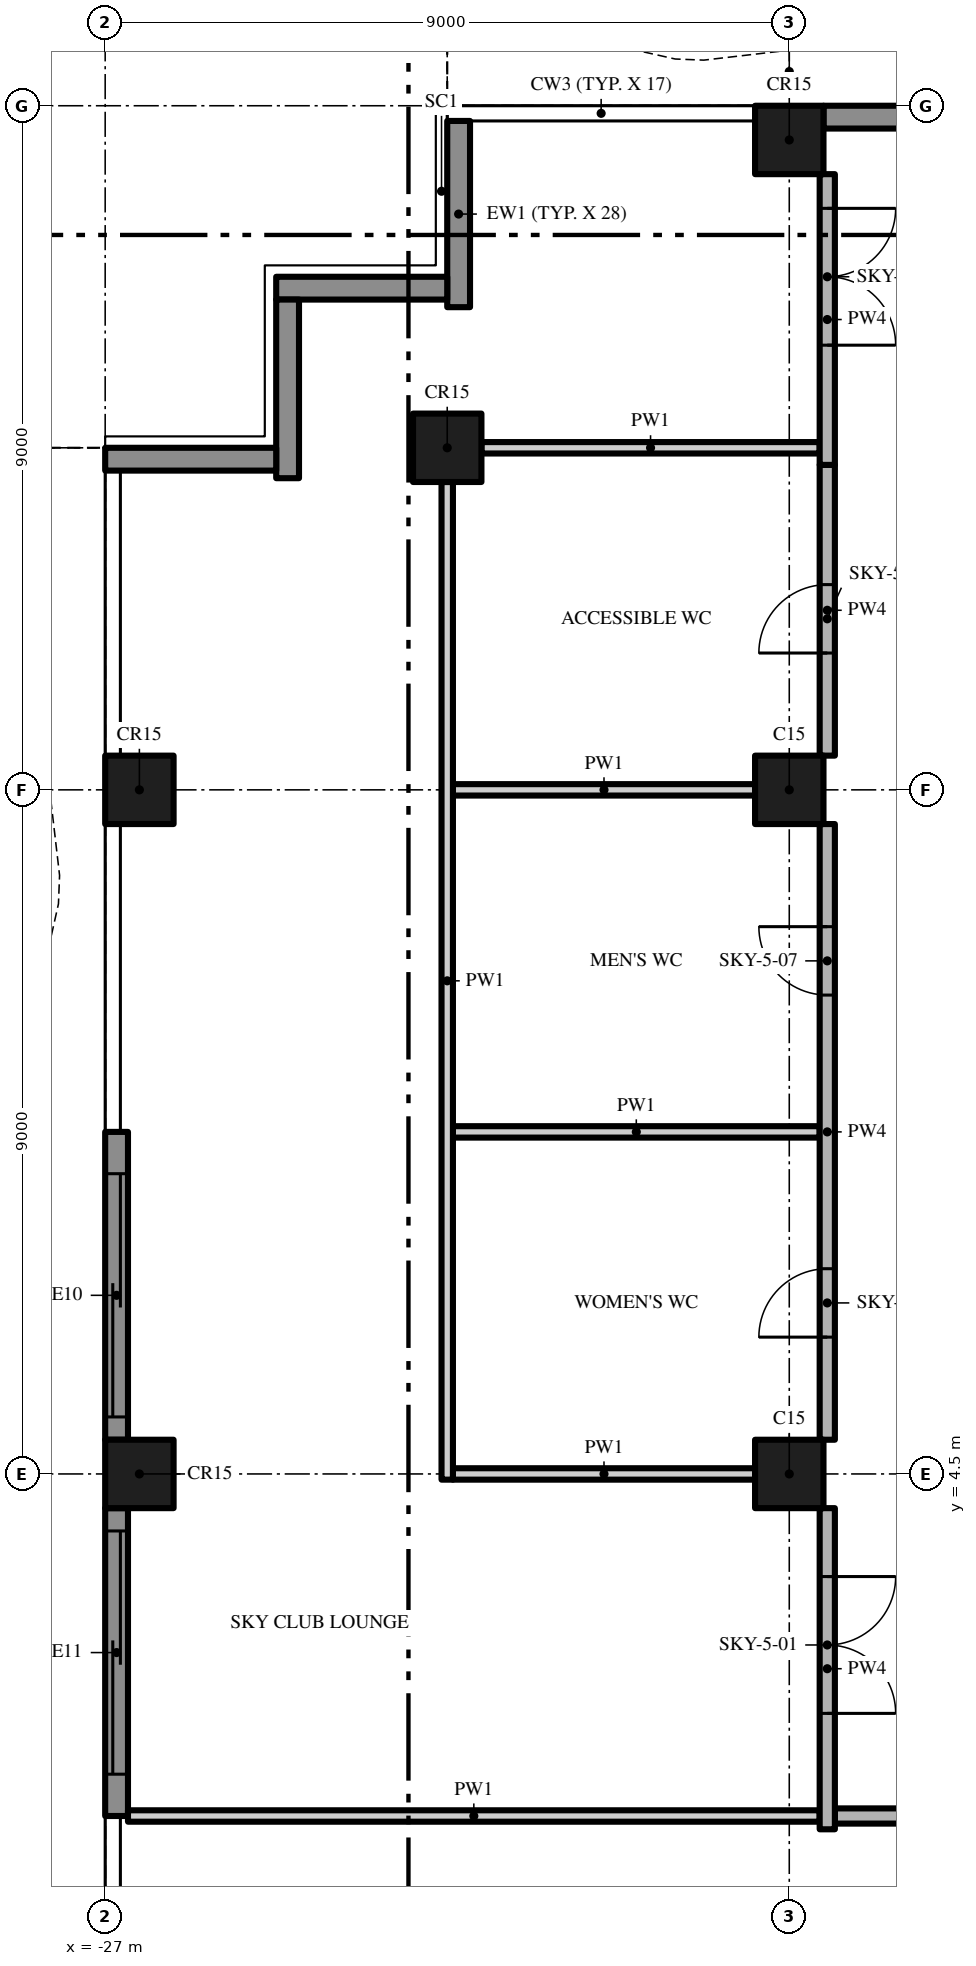
"""IFC4 building model, lengths in metres.
Left out: names, types, materials, properties, quantities, classifications, styles, units other than length and angle.
Written with IfcOpenShell. Run it as: python <this file> out.ifc"""

import sys

from ifc_helpers import new_model, si_unit, direction, frame, frame_2d, origin, origin_2d, place, context, subcontext, project, spatial, polyline, rectangle, outline, extrude, element, fill, save


model = new_model("IFC4")
c1 = context("Model", 3, precision=1e-05, world=origin(), true_north=direction((0.0, 1.0)))
c2 = subcontext(c1, "Body", "Model", "MODEL_VIEW")
j1 = project(units=[si_unit("LENGTHUNIT", "METRE"), si_unit("PLANEANGLEUNIT", "RADIAN")], contexts=[c1])
p1 = place(None, origin())
s1 = spatial("IfcSite", under=j1, at=p1, CompositionType="ELEMENT")
p2 = place(p1, origin())
s2 = spatial("IfcBuilding", under=s1, at=p2, CompositionType="ELEMENT")
p3 = place(p2, frame((0.0, 0.0, 284.4)))
s3 = spatial("IfcBuildingStorey", under=s2, at=p3, CompositionType="ELEMENT", Elevation=284.4)
for number, where, z_axis, x_axis in (
    (1, (-18.0, 13.5, 0.0), (0.0, 0.0, 1.0), (1.0, 0.0, 0.0)),
    (2, (-18.0, 22.05, 0.0), (0.0, 0.0, 1.0), (1.0, 0.0, 0.0)),
    (3, (-18.0, 4.5, 0.0), (0.0, 0.0, 1.0), (1.0, 0.0, 0.0)),
    (4, (-26.55, 13.5, 0.0), (0.0, 0.0, 1.0), (1.0, 0.0, 0.0)),
    (5, (-22.5, 18.0, 0.0), (0.0, 0.0, 1.0), (1.0, 0.0, 0.0)),
    (6, (-26.55, 4.5, 0.0), (0.0, 0.0, 1.0), (1.0, 0.0, 0.0)),
):
    element("IfcColumn", number, at=place(p3, frame(where, z_axis=z_axis, x_axis=x_axis)), inside=s3, PredefinedType="COLUMN", context=c2, shape_type="SweptSolid", body=[
        extrude(rectangle(XDim=0.9, YDim=0.9, at=origin_2d()), origin(), (0.0, 0.0, 1.0), 4.7),
    ])
p4 = place(p3, frame((-17.55, 22.35, 0.0), z_axis=(0.0, 0.0, 1.0), x_axis=(1.0, 0.0, 0.0)))
e7 = element("IfcWall", 7, at=p4, inside=s3, PredefinedType="SOLIDWALL", context=c2, shape_type="SweptSolid", body=[
    extrude(rectangle(XDim=4.05, YDim=0.3, at=frame_2d((2.025, 0.0))), origin(), (0.0, 0.0, 1.0), 4.7),
])
p5 = place(p4, frame((1.1, 0.0, 0.0)))
e8 = element("IfcOpeningElement", 8, at=p5, cuts=e7, PredefinedType="OPENING", context=c2, shape_type="SweptSolid", body=[
    extrude(rectangle(XDim=2.4, YDim=2.4, at=frame_2d((1.2, 1.2))), frame((0.0, 0.16, 0.0), z_axis=(0.0, -1.0, 0.0), x_axis=(1.0, 0.0, 0.0)), (0.0, 0.0, 1.0), 0.32),
])
p6 = place(p3, frame((-22.35, 19.85, 0.0), z_axis=(0.0, 0.0, 1.0), x_axis=(0.0, 1.0, 0.0)))
e9 = element("IfcWall", 9, at=p6, inside=s3, PredefinedType="SOLIDWALL", context=c2, shape_type="SweptSolid", body=[
    extrude(rectangle(XDim=2.45, YDim=0.3, at=frame_2d((1.225, 0.0))), origin(), (0.0, 0.0, 1.0), 4.7),
])
p7 = place(p3, frame((-24.75, 20.1, 0.0), z_axis=(0.0, 0.0, 1.0), x_axis=(1.0, 0.0, 0.0)))
e10 = element("IfcWall", 10, at=p7, inside=s3, PredefinedType="SOLIDWALL", context=c2, shape_type="SweptSolid", body=[
    extrude(rectangle(XDim=2.25, YDim=0.3, at=frame_2d((1.125, 0.0))), origin(), (0.0, 0.0, 1.0), 4.7),
])
p8 = place(p3, frame((-24.6, 17.6, 0.0), z_axis=(0.0, 0.0, 1.0), x_axis=(0.0, 1.0, 0.0)))
e11 = element("IfcWall", 11, at=p8, inside=s3, PredefinedType="SOLIDWALL", context=c2, shape_type="SweptSolid", body=[
    extrude(rectangle(XDim=2.35, YDim=0.3, at=frame_2d((1.175, 0.0))), origin(), (0.0, 0.0, 1.0), 4.7),
])
p9 = place(p3, frame((-27.0, 17.85, 0.0), z_axis=(0.0, 0.0, 1.0), x_axis=(1.0, 0.0, 0.0)))
e12 = element("IfcWall", 12, at=p9, inside=s3, PredefinedType="SOLIDWALL", context=c2, shape_type="SweptSolid", body=[
    extrude(rectangle(XDim=2.25, YDim=0.3, at=frame_2d((1.125, 0.0))), origin(), (0.0, 0.0, 1.0), 4.7),
])
p10 = place(p3, frame((-26.85, 4.95, 0.0), z_axis=(0.0, 0.0, 1.0), x_axis=(0.0, 1.0, 0.0)))
e13 = element("IfcWall", 13, at=p10, inside=s3, PredefinedType="SOLIDWALL", context=c2, shape_type="SweptSolid", body=[
    extrude(rectangle(XDim=4.05, YDim=0.3, at=frame_2d((2.025, 0.0))), origin(), (0.0, 0.0, 1.0), 4.7),
])
p11 = place(p10, frame((0.3, 0.0, 0.0)))
e14 = element("IfcOpeningElement", 14, at=p11, cuts=e13, PredefinedType="OPENING", context=c2, shape_type="SweptSolid", body=[
    extrude(rectangle(XDim=3.2, YDim=2.4, at=frame_2d((1.6, 1.2))), frame((0.0, 0.16, 0.0), z_axis=(0.0, -1.0, 0.0), x_axis=(1.0, 0.0, 0.0)), (0.0, 0.0, 1.0), 0.32),
])
p12 = place(p3, frame((-26.85, 0.0, 0.0), z_axis=(0.0, 0.0, 1.0), x_axis=(0.0, 1.0, 0.0)))
e15 = element("IfcWall", 15, at=p12, inside=s3, PredefinedType="SOLIDWALL", context=c2, shape_type="SweptSolid", body=[
    extrude(rectangle(XDim=4.05, YDim=0.3, at=frame_2d((2.025, 0.0))), origin(), (0.0, 0.0, 1.0), 4.7),
])
p13 = place(p12, frame((0.55, 0.0, 0.0)))
e16 = element("IfcOpeningElement", 16, at=p13, cuts=e15, PredefinedType="OPENING", context=c2, shape_type="SweptSolid", body=[
    extrude(rectangle(XDim=3.2, YDim=2.4, at=frame_2d((1.6, 1.2))), frame((0.0, 0.16, 0.0), z_axis=(0.0, -1.0, 0.0), x_axis=(1.0, 0.0, 0.0)), (0.0, 0.0, 1.0), 0.32),
])
p14 = place(p3, origin())
e17 = element("IfcWall", 17, at=p14, inside=s3, PredefinedType="USERDEFINED", context=c2, shape_type="SweptSolid", body=[
    extrude(outline(polyline([(-13.5, 25.149), (-15.0, 24.488), (-16.5, 23.755), (-18.0, 23.231), (-19.125, 23.1), (-19.5, 23.115), (-21.0, 23.451), (-22.5, 24.112), (-22.601, 23.883), (-21.079, 23.213), (-19.533, 22.866), (-19.115, 22.849), (-17.944, 22.986), (-16.404, 23.524), (-14.895, 24.261), (-13.399, 24.92), (-13.5, 25.149)])), origin(), (0.0, 0.0, 1.0), 0.9),
])
p15 = place(p3, origin())
e18 = element("IfcWall", 18, at=p15, inside=s3, PredefinedType="USERDEFINED", context=c2, shape_type="SweptSolid", body=[
    extrude(outline(polyline([(-29.649, 18.0), (-28.988, 16.5), (-28.255, 15.0), (-27.731, 13.5), (-27.6, 12.375), (-27.615, 12.0), (-27.951, 10.5), (-28.612, 9.0), (-29.345, 7.5), (-29.869, 6.0), (-30.0, 4.875), (-29.985, 4.5), (-29.649, 3.0), (-28.988, 1.5), (-28.255, 0.0), (-27.731, -1.5), (-27.6, -2.625), (-27.615, -3.0), (-27.951, -4.5), (-28.612, -6.0), (-29.345, -7.5), (-29.869, -9.0), (-30.0, -10.125), (-29.985, -10.5), (-29.649, -12.0), (-28.988, -13.5), (-28.255, -15.0), (-27.731, -16.5), (-27.6, -17.625), (-27.615, -18.0), (-27.365, -18.01), (-27.349, -17.615), (-27.486, -16.444), (-28.024, -14.904), (-28.761, -13.395), (-29.41, -11.921), (-29.736, -10.467), (-29.749, -10.135), (-29.624, -9.056), (-29.114, -7.596), (-28.385, -6.105), (-27.713, -4.579), (-27.366, -3.033), (-27.349, -2.615), (-27.486, -1.444), (-28.024, 0.096), (-28.761, 1.605), (-29.41, 3.079), (-29.736, 4.533), (-29.749, 4.865), (-29.624, 5.944), (-29.114, 7.404), (-28.385, 8.895), (-27.713, 10.421), (-27.366, 11.967), (-27.349, 12.385), (-27.486, 13.556), (-28.024, 15.096), (-28.761, 16.605), (-29.42, 18.101), (-29.649, 18.0)])), origin(), (0.0, 0.0, 1.0), 0.9),
])
p16 = place(p3, frame((-17.4, 0.0, 0.0), z_axis=(0.0, 0.0, 1.0), x_axis=(1.0, 0.0, 0.0)))
e19 = element("IfcWall", 19, at=p16, inside=s3, PredefinedType="PARTITIONING", context=c2, shape_type="SweptSolid", body=[
    extrude(rectangle(XDim=34.8, YDim=0.2, at=frame_2d((17.4, 0.0))), origin(), (0.0, 0.0, 1.0), 4.7),
])
p17 = place(p16, frame((7.65, 0.0, 0.0)))
e20 = element("IfcOpeningElement", 20, at=p17, cuts=e19, PredefinedType="OPENING", context=c2, shape_type="SweptSolid", body=[
    extrude(rectangle(XDim=2.0, YDim=2.4, at=frame_2d((1.0, 1.2))), frame((0.0, 0.11, 0.0), z_axis=(0.0, -1.0, 0.0), x_axis=(1.0, 0.0, 0.0)), (0.0, 0.0, 1.0), 0.22),
])
p18 = place(p16, frame((25.15, 0.0, 0.0)))
e21 = element("IfcOpeningElement", 21, at=p18, cuts=e19, PredefinedType="OPENING", context=c2, shape_type="SweptSolid", body=[
    extrude(rectangle(XDim=2.0, YDim=2.4, at=frame_2d((1.0, 1.2))), frame((0.0, 0.11, 0.0), z_axis=(0.0, -1.0, 0.0), x_axis=(1.0, 0.0, 0.0)), (0.0, 0.0, 1.0), 0.22),
])
p19 = place(p3, frame((-26.7, 0.0, 0.0), z_axis=(0.0, 0.0, 1.0), x_axis=(1.0, 0.0, 0.0)))
e22 = element("IfcWall", 22, at=p19, inside=s3, PredefinedType="PARTITIONING", context=c2, shape_type="SweptSolid", body=[
    extrude(rectangle(XDim=9.1, YDim=0.15, at=frame_2d((4.55, 0.0))), origin(), (0.0, 0.0, 1.0), 4.7),
])
p20 = place(p3, frame((-22.425, 4.5, 0.0), z_axis=(0.0, 0.0, 1.0), x_axis=(1.0, 0.0, 0.0)))
e23 = element("IfcWall", 23, at=p20, inside=s3, PredefinedType="PARTITIONING", context=c2, shape_type="SweptSolid", body=[
    extrude(rectangle(XDim=3.975, YDim=0.15, at=frame_2d((1.988, 0.0))), origin(), (0.0, 0.0, 1.0), 4.7),
])
p21 = place(p3, frame((-22.425, 9.0, 0.0), z_axis=(0.0, 0.0, 1.0), x_axis=(1.0, 0.0, 0.0)))
e24 = element("IfcWall", 24, at=p21, inside=s3, PredefinedType="PARTITIONING", context=c2, shape_type="SweptSolid", body=[
    extrude(rectangle(XDim=4.825, YDim=0.15, at=frame_2d((2.413, 0.0))), origin(), (0.0, 0.0, 1.0), 4.7),
])
p22 = place(p3, frame((-22.425, 13.5, 0.0), z_axis=(0.0, 0.0, 1.0), x_axis=(1.0, 0.0, 0.0)))
e25 = element("IfcWall", 25, at=p22, inside=s3, PredefinedType="PARTITIONING", context=c2, shape_type="SweptSolid", body=[
    extrude(rectangle(XDim=3.975, YDim=0.15, at=frame_2d((1.988, 0.0))), origin(), (0.0, 0.0, 1.0), 4.7),
])
p23 = place(p3, frame((-22.05, 18.0, 0.0), z_axis=(0.0, 0.0, 1.0), x_axis=(1.0, 0.0, 0.0)))
e26 = element("IfcWall", 26, at=p23, inside=s3, PredefinedType="PARTITIONING", context=c2, shape_type="SweptSolid", body=[
    extrude(rectangle(XDim=4.45, YDim=0.15, at=frame_2d((2.225, 0.0))), origin(), (0.0, 0.0, 1.0), 4.7),
])
p24 = place(p3, frame((-22.5, 4.425, 0.0), z_axis=(0.0, 0.0, 1.0), x_axis=(0.0, 1.0, 0.0)))
e27 = element("IfcWall", 27, at=p24, inside=s3, PredefinedType="PARTITIONING", context=c2, shape_type="SweptSolid", body=[
    extrude(rectangle(XDim=13.125, YDim=0.15, at=frame_2d((6.562, 0.0))), origin(), (0.0, 0.0, 1.0), 4.7),
])
p25 = place(p3, frame((-17.5, 4.05, 0.0), z_axis=(0.0, 0.0, 1.0), x_axis=(0.0, -1.0, 0.0)))
e28 = element("IfcWall", 28, at=p25, inside=s3, PredefinedType="PARTITIONING", context=c2, shape_type="SweptSolid", body=[
    extrude(rectangle(XDim=4.225, YDim=0.2, at=frame_2d((2.112, 0.0))), origin(), (0.0, 0.0, 1.0), 4.7),
])
p26 = place(p25, frame((0.9, 0.0, 0.0)))
e29 = element("IfcOpeningElement", 29, at=p26, cuts=e28, PredefinedType="OPENING", context=c2, shape_type="SweptSolid", body=[
    extrude(rectangle(XDim=1.8, YDim=2.4, at=frame_2d((0.9, 1.2))), frame((0.0, 0.11, 0.0), z_axis=(0.0, -1.0, 0.0), x_axis=(1.0, 0.0, 0.0)), (0.0, 0.0, 1.0), 0.22),
])
p27 = place(p3, frame((-17.5, 4.95, 0.0), z_axis=(0.0, 0.0, 1.0), x_axis=(0.0, 1.0, 0.0)))
e30 = element("IfcWall", 30, at=p27, inside=s3, PredefinedType="PARTITIONING", context=c2, shape_type="SweptSolid", body=[
    extrude(rectangle(XDim=8.1, YDim=0.2, at=frame_2d((4.05, 0.0))), origin(), (0.0, 0.0, 1.0), 4.7),
])
p28 = place(p27, frame((1.35, 0.0, 0.0)))
e31 = element("IfcOpeningElement", 31, at=p28, cuts=e30, PredefinedType="OPENING", context=c2, shape_type="SweptSolid", body=[
    extrude(rectangle(XDim=0.9, YDim=2.1, at=frame_2d((0.45, 1.05))), frame((0.0, 0.11, 0.0), z_axis=(0.0, -1.0, 0.0), x_axis=(1.0, 0.0, 0.0)), (0.0, 0.0, 1.0), 0.22),
])
p29 = place(p27, frame((5.85, 0.0, 0.0)))
e32 = element("IfcOpeningElement", 32, at=p29, cuts=e30, PredefinedType="OPENING", context=c2, shape_type="SweptSolid", body=[
    extrude(rectangle(XDim=0.9, YDim=2.1, at=frame_2d((0.45, 1.05))), frame((0.0, 0.11, 0.0), z_axis=(0.0, -1.0, 0.0), x_axis=(1.0, 0.0, 0.0)), (0.0, 0.0, 1.0), 0.22),
])
p30 = place(p3, frame((-17.5, 13.95, 0.0), z_axis=(0.0, 0.0, 1.0), x_axis=(0.0, 1.0, 0.0)))
e33 = element("IfcWall", 33, at=p30, inside=s3, PredefinedType="PARTITIONING", context=c2, shape_type="SweptSolid", body=[
    extrude(rectangle(XDim=3.825, YDim=0.2, at=frame_2d((1.913, 0.0))), origin(), (0.0, 0.0, 1.0), 4.7),
])
p31 = place(p30, frame((1.35, 0.0, 0.0)))
e34 = element("IfcOpeningElement", 34, at=p31, cuts=e33, PredefinedType="OPENING", context=c2, shape_type="SweptSolid", body=[
    extrude(rectangle(XDim=0.9, YDim=2.1, at=frame_2d((0.45, 1.05))), frame((0.0, 0.11, 0.0), z_axis=(0.0, -1.0, 0.0), x_axis=(1.0, 0.0, 0.0)), (0.0, 0.0, 1.0), 0.22),
])
p32 = place(p3, frame((-17.5, 21.6, 0.0), z_axis=(0.0, 0.0, 1.0), x_axis=(0.0, -1.0, 0.0)))
e35 = element("IfcWall", 35, at=p32, inside=s3, PredefinedType="PARTITIONING", context=c2, shape_type="SweptSolid", body=[
    extrude(rectangle(XDim=3.825, YDim=0.2, at=frame_2d((1.913, 0.0))), origin(), (0.0, 0.0, 1.0), 4.7),
])
p33 = place(p32, frame((0.45, 0.0, 0.0)))
e36 = element("IfcOpeningElement", 36, at=p33, cuts=e35, PredefinedType="OPENING", context=c2, shape_type="SweptSolid", body=[
    extrude(rectangle(XDim=1.8, YDim=2.4, at=frame_2d((0.9, 1.2))), frame((0.0, 0.11, 0.0), z_axis=(0.0, -1.0, 0.0), x_axis=(1.0, 0.0, 0.0)), (0.0, 0.0, 1.0), 0.22),
])
p34 = place(p11, origin())
e37 = element("IfcDoor", 37, at=p34, inside=s3, OperationType="SINGLE_SWING_LEFT", PredefinedType="DOOR", context=c2, shape_type="SweptSolid", body=[
    extrude(rectangle(XDim=3.2, YDim=2.4, at=frame_2d((1.6, 1.2))), frame((0.0, 0.025, 0.0), z_axis=(0.0, -1.0, 0.0), x_axis=(1.0, 0.0, 0.0)), (0.0, 0.0, 1.0), 0.05),
])
fill(e14, e37)
p35 = place(p13, origin())
e38 = element("IfcDoor", 38, at=p35, inside=s3, OperationType="SINGLE_SWING_LEFT", PredefinedType="DOOR", context=c2, shape_type="SweptSolid", body=[
    extrude(rectangle(XDim=3.2, YDim=2.4, at=frame_2d((1.6, 1.2))), frame((0.0, 0.025, 0.0), z_axis=(0.0, -1.0, 0.0), x_axis=(1.0, 0.0, 0.0)), (0.0, 0.0, 1.0), 0.05),
])
fill(e16, e38)
p36 = place(p26, origin())
e39 = element("IfcDoor", 39, at=p36, inside=s3, OperationType="DOUBLE_DOOR_SINGLE_SWING", PredefinedType="DOOR", context=c2, shape_type="SweptSolid", body=[
    extrude(rectangle(XDim=1.8, YDim=2.4, at=frame_2d((0.9, 1.2))), frame((0.0, 0.025, 0.0), z_axis=(0.0, -1.0, 0.0), x_axis=(1.0, 0.0, 0.0)), (0.0, 0.0, 1.0), 0.05),
])
fill(e29, e39)
p37 = place(p33, origin())
e40 = element("IfcDoor", 40, at=p37, inside=s3, OperationType="DOUBLE_DOOR_SINGLE_SWING", PredefinedType="DOOR", context=c2, shape_type="SweptSolid", body=[
    extrude(rectangle(XDim=1.8, YDim=2.4, at=frame_2d((0.9, 1.2))), frame((0.0, 0.025, 0.0), z_axis=(0.0, -1.0, 0.0), x_axis=(1.0, 0.0, 0.0)), (0.0, 0.0, 1.0), 0.05),
])
fill(e36, e40)
p38 = place(p28, origin())
e41 = element("IfcDoor", 41, at=p38, inside=s3, OperationType="SINGLE_SWING_LEFT", PredefinedType="DOOR", context=c2, shape_type="SweptSolid", body=[
    extrude(rectangle(XDim=0.9, YDim=2.1, at=frame_2d((0.45, 1.05))), frame((0.0, 0.025, 0.0), z_axis=(0.0, -1.0, 0.0), x_axis=(1.0, 0.0, 0.0)), (0.0, 0.0, 1.0), 0.05),
])
fill(e31, e41)
p39 = place(p29, origin())
e42 = element("IfcDoor", 42, at=p39, inside=s3, OperationType="SINGLE_SWING_RIGHT", PredefinedType="DOOR", context=c2, shape_type="SweptSolid", body=[
    extrude(rectangle(XDim=0.9, YDim=2.1, at=frame_2d((0.45, 1.05))), frame((0.0, 0.025, 0.0), z_axis=(0.0, -1.0, 0.0), x_axis=(1.0, 0.0, 0.0)), (0.0, 0.0, 1.0), 0.05),
])
fill(e32, e42)
p40 = place(p31, origin())
e43 = element("IfcDoor", 43, at=p40, inside=s3, OperationType="SINGLE_SWING_LEFT", PredefinedType="DOOR", context=c2, shape_type="SweptSolid", body=[
    extrude(rectangle(XDim=0.9, YDim=2.1, at=frame_2d((0.45, 1.05))), frame((0.0, 0.025, 0.0), z_axis=(0.0, -1.0, 0.0), x_axis=(1.0, 0.0, 0.0)), (0.0, 0.0, 1.0), 0.05),
])
fill(e34, e43)
save(model, sys.argv[1])
